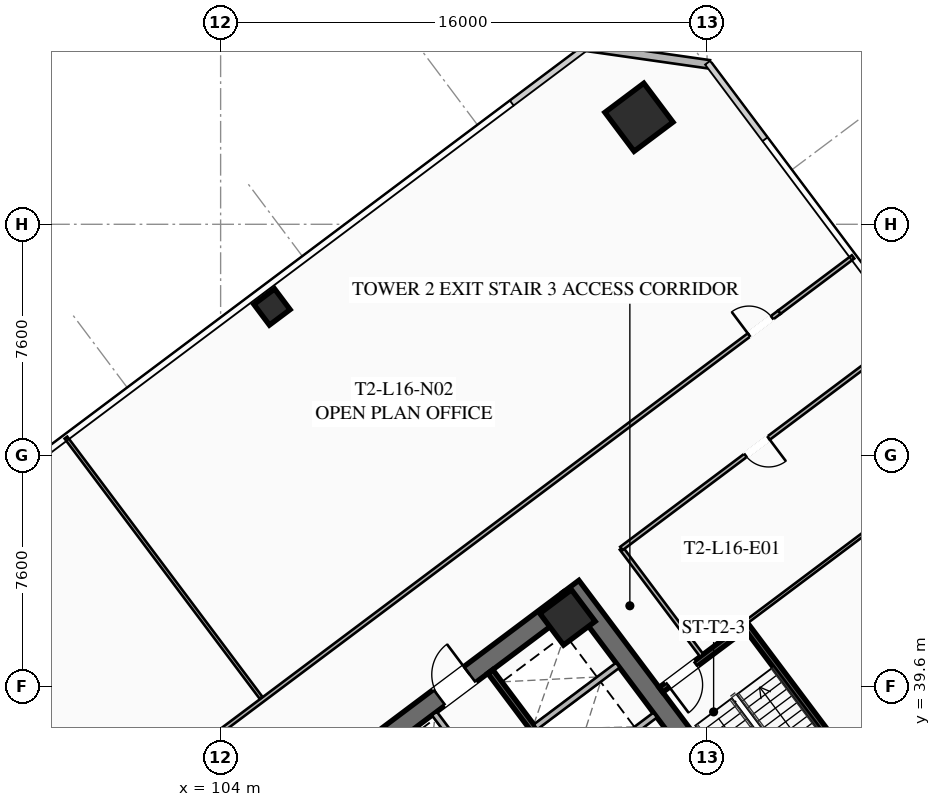
"""IFC4 building model, lengths in metres.
Left out: names, types, materials, properties, quantities, classifications, styles, units other than length and angle.
Written with IfcOpenShell. Run it as: python <this file> out.ifc"""

import sys

from ifc_helpers import new_model, si_unit, direction, frame, frame_2d, origin, origin_2d, place, context, subcontext, project, spatial, rectangle, hollow_rectangle, extrude, element, fill, save


model = new_model("IFC4")
c1 = context("Model", 3, precision=1e-05, world=origin(), true_north=direction((0.0, 1.0)))
c2 = subcontext(c1, "Body", "Model", "MODEL_VIEW")
j1 = project(units=[si_unit("LENGTHUNIT", "METRE"), si_unit("PLANEANGLEUNIT", "RADIAN")], contexts=[c1])
p1 = place(None, origin())
s1 = spatial("IfcSite", under=j1, at=p1, CompositionType="ELEMENT")
p2 = place(p1, origin())
s2 = spatial("IfcBuilding", under=s1, at=p2, CompositionType="ELEMENT")
p3 = place(p2, frame((0.0, 0.0, 63.65)))
s3 = spatial("IfcBuildingStorey", under=s2, at=p3, CompositionType="ELEMENT", Elevation=63.65)
p4 = place(p3, frame((115.524, 42.893, 0.0), z_axis=(0.0, 0.0, 1.0), x_axis=(0.600005007985, -0.799996243986, 0.0)))
e1 = element("IfcWall", 1, at=p4, inside=s3, PredefinedType="SHEAR", context=c2, shape_type="SweptSolid", body=[
    extrude(rectangle(XDim=15.6, YDim=0.65, at=frame_2d((7.8, 0.0))), origin(), (0.0, 0.0, 1.0), 3.55),
])
p5 = place(p3, frame((103.571, 33.522, 0.0), z_axis=(0.0, 0.0, 1.0), x_axis=(0.799998028465, 0.600002628705, 0.0)))
e2 = element("IfcWall", 2, at=p5, inside=s3, PredefinedType="SHEAR", context=c2, shape_type="SweptSolid", body=[
    extrude(rectangle(XDim=14.86, YDim=0.65, at=frame_2d((7.43, 0.0))), origin(), (0.0, 0.0, 1.0), 3.55),
])
p6 = place(p5, frame((4.48, 0.0, 0.0)))
e3 = element("IfcOpeningElement", 3, at=p6, cuts=e2, PredefinedType="OPENING", context=c2, shape_type="SweptSolid", body=[
    extrude(rectangle(XDim=1.25, YDim=2.25, at=frame_2d((0.625, 1.125))), frame((0.0, 0.335, 0.0), z_axis=(0.0, -1.0, 0.0), x_axis=(1.0, 0.0, 0.0)), (0.0, 0.0, 1.0), 0.67),
])
p7 = place(p5, frame((9.53, 0.0, 0.0)))
e4 = element("IfcOpeningElement", 4, at=p7, cuts=e2, PredefinedType="OPENING", context=c2, shape_type="SweptSolid", body=[
    extrude(rectangle(XDim=1.25, YDim=2.25, at=frame_2d((0.625, 1.125))), frame((0.0, 0.335, 0.0), z_axis=(0.0, -1.0, 0.0), x_axis=(1.0, 0.0, 0.0)), (0.0, 0.0, 1.0), 0.67),
])
p8 = place(p3, frame((115.41, 41.87, 0.0), z_axis=(0.0, 0.0, 1.0), x_axis=(0.799999996291, 0.600000004945, 0.0)))
e5 = element("IfcColumn", 5, at=p8, inside=s3, PredefinedType="COLUMN", context=c2, shape_type="SweptSolid", body=[
    extrude(hollow_rectangle(XDim=1.3, YDim=1.3, WallThickness=0.05, at=origin_2d()), origin(), (0.0, 0.0, 1.0), 3.35),
])
p9 = place(p3, frame((117.76, 58.32, 0.0), z_axis=(0.0, 0.0, 1.0), x_axis=(0.799999996291, 0.600000004945, 0.0)))
e6 = element("IfcColumn", 6, at=p9, inside=s3, PredefinedType="COLUMN", context=c2, shape_type="SweptSolid", body=[
    extrude(hollow_rectangle(XDim=1.6, YDim=1.6, WallThickness=0.06, at=origin_2d()), origin(), (0.0, 0.0, 1.0), 3.35),
])
p10 = place(p3, frame((105.69, 52.08, 0.0), z_axis=(0.0, 0.0, 1.0), x_axis=(0.799999996291, 0.600000004945, 0.0)))
e7 = element("IfcColumn", 7, at=p10, inside=s3, PredefinedType="COLUMN", context=c2, shape_type="SweptSolid", body=[
    extrude(hollow_rectangle(XDim=0.85, YDim=0.85, WallThickness=0.035, at=origin_2d()), origin(), (0.0, 0.0, 1.0), 3.35),
])
p11 = place(p3, frame((116.02, 60.64, 0.0), z_axis=(0.0, 0.0, 1.0), x_axis=(0.989955445613, -0.14137968631, 0.0)))
e8 = element("IfcWall", 8, at=p11, inside=s3, PredefinedType="SOLIDWALL", context=c2, shape_type="SweptSolid", body=[
    extrude(rectangle(XDim=4.101, YDim=0.28, at=frame_2d((2.051, 0.0))), origin(), (0.0, 0.0, 1.0), 3.35),
])
p12 = place(p3, frame((112.87, 40.09, 0.0), z_axis=(0.0, 0.0, 1.0), x_axis=(0.599975393228, -0.800018454488, 0.0)))
e9 = element("IfcWall", 9, at=p12, inside=s3, PredefinedType="SHEAR", context=c2, shape_type="SweptSolid", body=[
    extrude(rectangle(XDim=6.35, YDim=0.2, at=frame_2d((3.175, 0.0))), origin(), (0.0, 0.0, 1.0), 3.35),
])
for number, where, z_axis, x_axis in (
    (10, (115.59, 36.63, 0.0), (0.0, 0.0, 1.0), (0.8, 0.6, 0.0)),
    (11, (114.36, 38.27, 0.0), (0.0, 0.0, 1.0), (0.8, 0.6, 0.0)),
):
    element("IfcWall", number, at=place(p3, frame(where, z_axis=z_axis, x_axis=x_axis)), inside=s3, PredefinedType="SOLIDWALL", context=c2, shape_type="SweptSolid", body=[
        extrude(rectangle(XDim=3.38, YDim=0.2, at=frame_2d((1.69, 0.0))), origin(), (0.0, 0.0, 1.0), 3.35),
    ])
p13 = place(p3, frame((115.11, 33.27, 0.0), z_axis=(0.0, 0.0, 1.0), x_axis=(-0.600011488909, 0.79999138319, 0.0)))
e12 = element("IfcWall", 12, at=p13, inside=s3, PredefinedType="SOLIDWALL", context=c2, shape_type="SweptSolid", body=[
    extrude(rectangle(XDim=6.8, YDim=0.2, at=frame_2d((3.4, 0.0))), origin(), (0.0, 0.0, 1.0), 3.35),
])
p14 = place(p3, frame((125.304, 36.228, 0.0), z_axis=(0.0, 0.0, 1.0), x_axis=(-0.59998851072, 0.800008616831, 0.0)))
e13 = element("IfcWall", 13, at=p14, inside=s3, PredefinedType="SHEAR", context=c2, shape_type="SweptSolid", body=[
    extrude(rectangle(XDim=6.8, YDim=0.2, at=frame_2d((3.4, 0.0))), origin(), (0.0, 0.0, 1.0), 3.35),
])
p15 = place(p3, frame((121.204, 41.528, 0.0), z_axis=(0.0, 0.0, 1.0), x_axis=(-0.800017232136, -0.599977023131, 0.0)))
e14 = element("IfcWall", 14, at=p15, inside=s3, PredefinedType="SHEAR", context=c2, shape_type="SweptSolid", body=[
    extrude(rectangle(XDim=3.4, YDim=0.2, at=frame_2d((1.7, 0.0))), origin(), (0.0, 0.0, 1.0), 3.35),
])
p16 = place(p15, frame((1.975, 0.0, 0.0)))
e15 = element("IfcOpeningElement", 15, at=p16, cuts=e14, PredefinedType="OPENING", context=c2, shape_type="SweptSolid", body=[
    extrude(rectangle(XDim=1.15, YDim=2.2, at=frame_2d((0.575, 1.1))), frame((0.0, 0.11, 0.0), z_axis=(0.0, -1.0, 0.0), x_axis=(1.0, 0.0, 0.0)), (0.0, 0.0, 1.0), 0.22),
])
p17 = place(p3, frame((119.824, 40.618, 0.0), z_axis=(0.0, 0.0, 1.0), x_axis=(-0.599982243973, 0.800013316712, 0.0)))
e16 = element("IfcWall", 16, at=p17, inside=s3, PredefinedType="PARTITIONING", context=c2, shape_type="SweptSolid", body=[
    extrude(rectangle(XDim=4.4, YDim=0.135, at=frame_2d((2.2, 0.0))), origin(), (0.0, 0.0, 1.0), 2.493),
])
p18 = place(p3, frame((98.516, 34.012, 0.0), z_axis=(0.0, 0.0, 1.0), x_axis=(0.799998035726, 0.600002619023, 0.0)))
e17 = element("IfcWall", 17, at=p18, inside=s3, PredefinedType="PARTITIONING", context=c2, shape_type="SweptSolid", body=[
    extrude(rectangle(XDim=29.83, YDim=0.135, at=frame_2d((14.915, 0.0))), origin(), (0.0, 0.0, 1.0), 2.493),
])
p19 = place(p18, frame((1.587, 0.0, 0.0)))
e18 = element("IfcOpeningElement", 18, at=p19, cuts=e17, PredefinedType="OPENING", context=c2, shape_type="SweptSolid", body=[
    extrude(rectangle(XDim=0.95, YDim=2.05, at=frame_2d((0.475, 1.025))), frame((0.0, 0.077, 0.0), z_axis=(0.0, -1.0, 0.0), x_axis=(1.0, 0.0, 0.0)), (0.0, 0.0, 1.0), 0.155),
])
p20 = place(p18, frame((28.58, 0.0, 0.0)))
e19 = element("IfcOpeningElement", 19, at=p20, cuts=e17, PredefinedType="OPENING", context=c2, shape_type="SweptSolid", body=[
    extrude(rectangle(XDim=0.95, YDim=2.05, at=frame_2d((0.475, 1.025))), frame((0.0, 0.077, 0.0), z_axis=(0.0, -1.0, 0.0), x_axis=(1.0, 0.0, 0.0)), (0.0, 0.0, 1.0), 0.155),
])
p21 = place(p3, frame((122.38, 51.91, 0.0), z_axis=(0.0, 0.0, 1.0), x_axis=(0.799990331366, 0.600012891296, 0.0)))
e20 = element("IfcWall", 20, at=p21, inside=s3, PredefinedType="PARTITIONING", context=c2, shape_type="SweptSolid", body=[
    extrude(rectangle(XDim=3.03, YDim=0.135, at=frame_2d((1.515, 0.0))), origin(), (0.0, 0.0, 1.0), 2.493),
])
p22 = place(p3, frame((105.332, 39.224, 0.0), z_axis=(0.0, 0.0, 1.0), x_axis=(-0.600003650761, 0.799997261916, 0.0)))
e21 = element("IfcWall", 21, at=p22, inside=s3, PredefinedType="PARTITIONING", context=c2, shape_type="SweptSolid", body=[
    extrude(rectangle(XDim=10.7, YDim=0.11, at=frame_2d((5.35, 0.0))), origin(), (0.0, 0.0, 1.0), 2.493),
])
p23 = place(p3, frame((126.664, 51.248, 0.0), z_axis=(0.0, 0.0, 1.0), x_axis=(-0.799995055373, -0.600006592779, 0.0)))
e22 = element("IfcWall", 22, at=p23, inside=s3, PredefinedType="PARTITIONING", context=c2, shape_type="SweptSolid", body=[
    extrude(rectangle(XDim=11.85, YDim=0.135, at=frame_2d((5.925, 0.0))), origin(), (0.0, 0.0, 1.0), 2.493),
])
p24 = place(p23, frame((5.8, 0.0, 0.0)))
e23 = element("IfcOpeningElement", 23, at=p24, cuts=e22, PredefinedType="OPENING", context=c2, shape_type="SweptSolid", body=[
    extrude(rectangle(XDim=0.95, YDim=2.05, at=frame_2d((0.475, 1.025))), frame((0.0, 0.077, 0.0), z_axis=(0.0, -1.0, 0.0), x_axis=(1.0, 0.0, 0.0)), (0.0, 0.0, 1.0), 0.155),
])
p25 = place(p3, frame((129.304, 47.728, 0.0), z_axis=(0.0, 0.0, 1.0), x_axis=(-0.8, -0.6, 0.0)))
e24 = element("IfcWall", 24, at=p25, inside=s3, PredefinedType="PARTITIONING", context=c2, shape_type="SweptSolid", body=[
    extrude(rectangle(XDim=10.0, YDim=0.11, at=frame_2d((5.0, 0.0))), origin(), (0.0, 0.0, 1.0), 2.493),
])
p26 = place(p7, origin())
e25 = element("IfcDoor", 25, at=p26, inside=s3, OperationType="SINGLE_SWING_RIGHT", PredefinedType="DOOR", context=c2, shape_type="SweptSolid", body=[
    extrude(rectangle(XDim=1.25, YDim=2.25, at=frame_2d((0.625, 1.125))), frame((0.0, 0.025, 0.0), z_axis=(0.0, -1.0, 0.0), x_axis=(1.0, 0.0, 0.0)), (0.0, 0.0, 1.0), 0.05),
])
fill(e4, e25)
p27 = place(p16, origin())
e26 = element("IfcDoor", 26, at=p27, inside=s3, OperationType="SINGLE_SWING_RIGHT", PredefinedType="DOOR", context=c2, shape_type="SweptSolid", body=[
    extrude(rectangle(XDim=1.15, YDim=2.2, at=frame_2d((0.575, 1.1))), frame((0.0, 0.025, 0.0), z_axis=(0.0, -1.0, 0.0), x_axis=(1.0, 0.0, 0.0)), (0.0, 0.0, 1.0), 0.05),
])
fill(e15, e26)
p28 = place(p20, origin())
e27 = element("IfcDoor", 27, at=p28, inside=s3, OperationType="SINGLE_SWING_LEFT", PredefinedType="DOOR", context=c2, shape_type="SweptSolid", body=[
    extrude(rectangle(XDim=0.95, YDim=2.05, at=frame_2d((0.475, 1.025))), frame((0.0, 0.025, 0.0), z_axis=(0.0, -1.0, 0.0), x_axis=(1.0, 0.0, 0.0)), (0.0, 0.0, 1.0), 0.05),
])
fill(e19, e27)
p29 = place(p24, origin())
e28 = element("IfcDoor", 28, at=p29, inside=s3, OperationType="SINGLE_SWING_LEFT", PredefinedType="DOOR", context=c2, shape_type="SweptSolid", body=[
    extrude(rectangle(XDim=0.95, YDim=2.05, at=frame_2d((0.475, 1.025))), frame((0.0, 0.025, 0.0), z_axis=(0.0, -1.0, 0.0), x_axis=(1.0, 0.0, 0.0)), (0.0, 0.0, 1.0), 0.05),
])
fill(e23, e28)
save(model, sys.argv[1])
